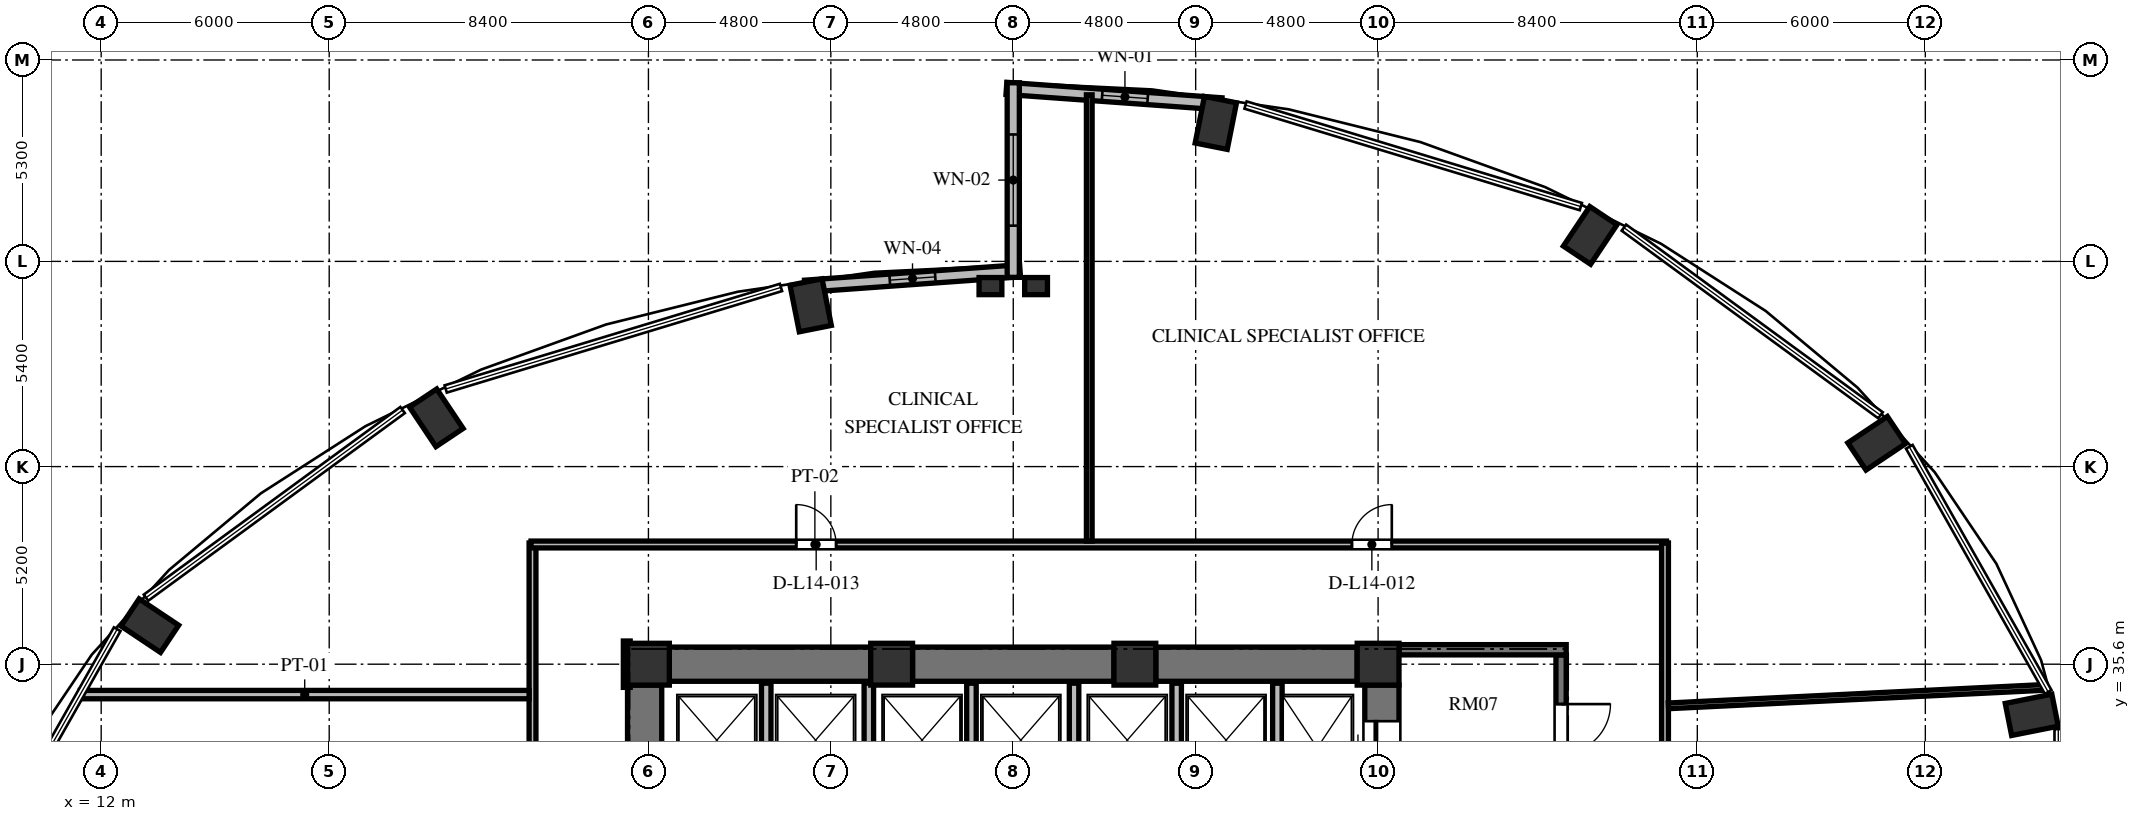
"""IFC4 building model, lengths in metres.
Left out: names, types, materials, properties, quantities, classifications, styles, units other than length and angle.
Written with IfcOpenShell. Run it as: python <this file> out.ifc"""

import sys

from ifc_helpers import new_model, si_unit, direction, frame, frame_2d, origin, origin_2d, place, context, subcontext, project, spatial, rectangle, extrude, element, fill, save


model = new_model("IFC4")
c1 = context("Model", 3, precision=1e-05, world=origin(), true_north=direction((0.0, 1.0)))
c2 = subcontext(c1, "Body", "Model", "MODEL_VIEW")
j1 = project(units=[si_unit("LENGTHUNIT", "METRE"), si_unit("PLANEANGLEUNIT", "RADIAN")], contexts=[c1])
p1 = place(None, origin())
s1 = spatial("IfcSite", under=j1, at=p1, CompositionType="ELEMENT")
p2 = place(p1, origin())
s2 = spatial("IfcBuilding", under=s1, at=p2, CompositionType="ELEMENT")
p3 = place(p2, frame((0.0, 0.0, 58.032)))
s3 = spatial("IfcBuildingStorey", under=s2, at=p3, CompositionType="ELEMENT", Elevation=58.032)
for number, where, z_axis, x_axis in (
    (1, (62.8, 34.268, 0.0), (0.0, 0.0, 1.0), (0.981, 0.195, 0.0)),
    (2, (58.72, 41.414, 0.0), (0.0, 0.0, 1.0), (0.831, 0.556, 0.0)),
    (3, (51.181, 46.884, 0.0), (0.0, 0.0, 1.0), (0.556, 0.831, 0.0)),
    (4, (41.331, 49.844, 0.0), (0.0, 0.0, 1.0), (0.195, 0.981, 0.0)),
    (5, (30.669, 45.044, 0.0), (0.0, 0.0, 1.0), (-0.195, 0.981, 0.0)),
    (6, (20.819, 42.084, 0.0), (0.0, 0.0, 1.0), (-0.556, 0.831, 0.0)),
    (7, (13.28, 36.614, 0.0), (0.0, 0.0, 1.0), (-0.831, 0.556, 0.0)),
):
    element("IfcColumn", number, at=place(p3, frame(where, z_axis=z_axis, x_axis=x_axis)), inside=s3, PredefinedType="COLUMN", context=c2, shape_type="SweptSolid", body=[
        extrude(rectangle(XDim=1.25, YDim=0.86, at=origin_2d()), origin(), (0.0, 0.0, 1.0), 3.648),
    ])
for number, where, z_axis, x_axis in (
    (8, (45.6, 35.6, 0.0), (0.0, 0.0, 1.0), (1.0, 0.0, 0.0)),
    (9, (39.2, 35.6, 0.0), (0.0, 0.0, 1.0), (1.0, 0.0, 0.0)),
    (10, (32.8, 35.6, 0.0), (0.0, 0.0, 1.0), (1.0, 0.0, 0.0)),
    (11, (26.4, 35.6, 0.0), (0.0, 0.0, 1.0), (1.0, 0.0, 0.0)),
):
    element("IfcColumn", number, at=place(p3, frame(where, z_axis=z_axis, x_axis=x_axis)), inside=s3, PredefinedType="COLUMN", context=c2, shape_type="SweptSolid", body=[
        extrude(rectangle(XDim=1.1, YDim=1.1, at=origin_2d()), origin(), (0.0, 0.0, 1.0), 3.648),
    ])
for number, where, z_axis, x_axis in (
    (12, (35.4, 45.55, 0.0), (0.0, 0.0, 1.0), (1.0, 0.0, 0.0)),
    (13, (36.6, 45.55, 0.0), (0.0, 0.0, 1.0), (1.0, 0.0, 0.0)),
):
    element("IfcColumn", number, at=place(p3, frame(where, z_axis=z_axis, x_axis=x_axis)), inside=s3, PredefinedType="PILASTER", context=c2, shape_type="SweptSolid", body=[
        extrude(rectangle(XDim=0.6, YDim=0.45, at=origin_2d()), origin(), (0.0, 0.0, 1.0), 3.648),
    ])
p4 = place(p3, frame((26.3, 20.95, 0.0), z_axis=(0.0, 0.0, 1.0), x_axis=(0.0, 1.0, 0.0)))
e14 = element("IfcWall", 14, at=p4, inside=s3, PredefinedType="SHEAR", context=c2, shape_type="SweptSolid", body=[
    extrude(rectangle(XDim=14.1, YDim=0.9, at=frame_2d((7.05, 0.0))), origin(), (0.0, 0.0, 1.0), 3.648),
])
p5 = place(p4, frame((6.5, 0.0, 0.0)))
e15 = element("IfcOpeningElement", 15, at=p5, cuts=e14, PredefinedType="OPENING", context=c2, shape_type="SweptSolid", body=[
    extrude(rectangle(XDim=1.2, YDim=2.15, at=frame_2d((0.6, 1.075))), frame((0.0, 0.46, 0.0), z_axis=(0.0, -1.0, 0.0), x_axis=(1.0, 0.0, 0.0)), (0.0, 0.0, 1.0), 0.92),
])
p6 = place(p4, frame((9.6, 0.0, 0.0)))
e16 = element("IfcOpeningElement", 16, at=p6, cuts=e14, PredefinedType="OPENING", context=c2, shape_type="SweptSolid", body=[
    extrude(rectangle(XDim=1.3, YDim=2.2, at=frame_2d((0.65, 1.1))), frame((0.0, 0.46, 0.0), z_axis=(0.0, -1.0, 0.0), x_axis=(1.0, 0.0, 0.0)), (0.0, 0.0, 1.0), 0.92),
])
p7 = place(p4, frame((3.26, 0.0, 0.0)))
e17 = element("IfcOpeningElement", 17, at=p7, cuts=e14, PredefinedType="OPENING", context=c2, shape_type="SweptSolid", body=[
    extrude(rectangle(XDim=1.3, YDim=2.2, at=frame_2d((0.65, 1.1))), frame((0.0, 0.46, 0.0), z_axis=(0.0, -1.0, 0.0), x_axis=(1.0, 0.0, 0.0)), (0.0, 0.0, 1.0), 0.92),
])
p8 = place(p3, frame((45.7, 20.95, 0.0), z_axis=(0.0, 0.0, 1.0), x_axis=(0.0, 1.0, 0.0)))
e18 = element("IfcWall", 18, at=p8, inside=s3, PredefinedType="SHEAR", context=c2, shape_type="SweptSolid", body=[
    extrude(rectangle(XDim=14.1, YDim=0.9, at=frame_2d((7.05, 0.0))), origin(), (0.0, 0.0, 1.0), 3.648),
])
p9 = place(p8, frame((11.75, 0.0, 0.0)))
e19 = element("IfcOpeningElement", 19, at=p9, cuts=e18, PredefinedType="OPENING", context=c2, shape_type="SweptSolid", body=[
    extrude(rectangle(XDim=1.4, YDim=2.3, at=frame_2d((0.7, 1.15))), frame((0.0, 0.46, 0.0), z_axis=(0.0, -1.0, 0.0), x_axis=(1.0, 0.0, 0.0)), (0.0, 0.0, 1.0), 0.92),
])
p10 = place(p8, frame((0.95, 0.0, 0.0)))
e20 = element("IfcOpeningElement", 20, at=p10, cuts=e18, PredefinedType="OPENING", context=c2, shape_type="SweptSolid", body=[
    extrude(rectangle(XDim=1.4, YDim=2.3, at=frame_2d((0.7, 1.15))), frame((0.0, 0.46, 0.0), z_axis=(0.0, -1.0, 0.0), x_axis=(1.0, 0.0, 0.0)), (0.0, 0.0, 1.0), 0.92),
])
p11 = place(p3, frame((26.95, 35.6, 0.0), z_axis=(0.0, 0.0, 1.0), x_axis=(1.0, 0.0, 0.0)))
e21 = element("IfcWall", 21, at=p11, inside=s3, PredefinedType="SHEAR", context=c2, shape_type="SweptSolid", body=[
    extrude(rectangle(XDim=5.3, YDim=0.9, at=frame_2d((2.65, 0.0))), origin(), (0.0, 0.0, 1.0), 3.648),
])
p12 = place(p3, frame((33.35, 35.6, 0.0), z_axis=(0.0, 0.0, 1.0), x_axis=(1.0, 0.0, 0.0)))
e22 = element("IfcWall", 22, at=p12, inside=s3, PredefinedType="SHEAR", context=c2, shape_type="SweptSolid", body=[
    extrude(rectangle(XDim=5.3, YDim=0.9, at=frame_2d((2.65, 0.0))), origin(), (0.0, 0.0, 1.0), 3.648),
])
p13 = place(p3, frame((39.75, 35.6, 0.0), z_axis=(0.0, 0.0, 1.0), x_axis=(1.0, 0.0, 0.0)))
e23 = element("IfcWall", 23, at=p13, inside=s3, PredefinedType="SHEAR", context=c2, shape_type="SweptSolid", body=[
    extrude(rectangle(XDim=5.3, YDim=0.9, at=frame_2d((2.65, 0.0))), origin(), (0.0, 0.0, 1.0), 3.648),
])
p14 = place(p3, frame((41.481, 50.346, 0.0), z_axis=(0.0, 0.0, 1.0), x_axis=(-0.997422321809, 0.071754525696, 0.0)))
e24 = element("IfcWall", 24, at=p14, inside=s3, PredefinedType="SOLIDWALL", context=c2, shape_type="SweptSolid", body=[
    extrude(rectangle(XDim=5.675, YDim=0.32, at=frame_2d((2.838, 0.0))), origin(), (0.0, 0.0, 1.0), 3.428),
])
p15 = place(p14, frame((1.949, 0.0, 0.85)))
e25 = element("IfcOpeningElement", 25, at=p15, cuts=e24, PredefinedType="OPENING", context=c2, shape_type="SweptSolid", body=[
    extrude(rectangle(XDim=1.2, YDim=2.2, at=frame_2d((0.6, 1.1))), frame((0.0, 0.17, 0.0), z_axis=(0.0, -1.0, 0.0), x_axis=(1.0, 0.0, 0.0)), (0.0, 0.0, 1.0), 0.34),
])
p16 = place(p3, frame((36.179, 45.953, 0.0), z_axis=(0.0, 0.0, 1.0), x_axis=(-0.997421878774, -0.071760683825, 0.0)))
e26 = element("IfcWall", 26, at=p16, inside=s3, PredefinedType="SOLIDWALL", context=c2, shape_type="SweptSolid", body=[
    extrude(rectangle(XDim=5.675, YDim=0.32, at=frame_2d((2.837, 0.0))), origin(), (0.0, 0.0, 1.0), 3.428),
])
p17 = place(p16, frame((2.237, 0.0, 0.85)))
e27 = element("IfcOpeningElement", 27, at=p17, cuts=e26, PredefinedType="OPENING", context=c2, shape_type="SweptSolid", body=[
    extrude(rectangle(XDim=1.2, YDim=1.8, at=frame_2d((0.6, 0.9))), frame((0.0, 0.17, 0.0), z_axis=(0.0, -1.0, 0.0), x_axis=(1.0, 0.0, 0.0)), (0.0, 0.0, 1.0), 0.34),
])
p18 = place(p3, frame((36.0, 50.9, 0.0), z_axis=(0.0, 0.0, 1.0), x_axis=(0.0, -1.0, 0.0)))
e28 = element("IfcWall", 28, at=p18, inside=s3, PredefinedType="SOLIDWALL", context=c2, shape_type="SweptSolid", body=[
    extrude(rectangle(XDim=5.12, YDim=0.32, at=frame_2d((2.56, 0.0))), origin(), (0.0, 0.0, 1.0), 3.428),
])
p19 = place(p18, frame((1.36, 0.0, 0.84)))
e29 = element("IfcOpeningElement", 29, at=p19, cuts=e28, PredefinedType="OPENING", context=c2, shape_type="SweptSolid", body=[
    extrude(rectangle(XDim=2.4, YDim=2.04, at=frame_2d((1.2, 1.02))), frame((0.0, 0.17, 0.0), z_axis=(0.0, -1.0, 0.0), x_axis=(1.0, 0.0, 0.0)), (0.0, 0.0, 1.0), 0.34),
])
p20 = place(p3, frame((42.95, 31.92, 0.0), z_axis=(0.0, 0.0, 1.0), x_axis=(0.0, 1.0, 0.0)))
e30 = element("IfcWall", 30, at=p20, inside=s3, PredefinedType="SOLIDWALL", context=c2, shape_type="SweptSolid", body=[
    extrude(rectangle(XDim=3.18, YDim=0.25, at=frame_2d((1.59, 0.0))), origin(), (0.0, 0.0, 1.0), 3.428),
])
for number, where, z_axis, x_axis in (
    (31, (29.5, 32.42, 0.0), (0.0, 0.0, 1.0), (0.0, 1.0, 0.0)),
    (32, (32.2, 32.42, 0.0), (0.0, 0.0, 1.0), (0.0, 1.0, 0.0)),
    (33, (34.9, 32.42, 0.0), (0.0, 0.0, 1.0), (0.0, 1.0, 0.0)),
    (34, (37.6, 32.42, 0.0), (0.0, 0.0, 1.0), (0.0, 1.0, 0.0)),
    (35, (40.3, 32.42, 0.0), (0.0, 0.0, 1.0), (0.0, 1.0, 0.0)),
):
    element("IfcWall", number, at=place(p3, frame(where, z_axis=z_axis, x_axis=x_axis)), inside=s3, PredefinedType="SOLIDWALL", context=c2, shape_type="SweptSolid", body=[
        extrude(rectangle(XDim=2.68, YDim=0.25, at=frame_2d((1.34, 0.0))), origin(), (0.0, 0.0, 1.0), 3.428),
    ])
p21 = place(p3, frame((50.415, 35.845, 0.0), z_axis=(0.0, 0.0, 1.0), x_axis=(0.0, -1.0, 0.0)))
e36 = element("IfcWall", 36, at=p21, inside=s3, PredefinedType="SHEAR", context=c2, shape_type="SweptSolid", body=[
    extrude(rectangle(XDim=15.825, YDim=0.27, at=frame_2d((7.913, 0.0))), origin(), (0.0, 0.0, 1.0), 3.648),
])
p22 = place(p21, frame((4.445, 0.0, 0.0)))
e37 = element("IfcOpeningElement", 37, at=p22, cuts=e36, PredefinedType="OPENING", context=c2, shape_type="SweptSolid", body=[
    extrude(rectangle(XDim=1.2, YDim=2.15, at=frame_2d((0.6, 1.075))), frame((0.0, 0.145, 0.0), z_axis=(0.0, -1.0, 0.0), x_axis=(1.0, 0.0, 0.0)), (0.0, 0.0, 1.0), 0.29),
])
p23 = place(p21, frame((1.295, 0.0, 0.0)))
e38 = element("IfcOpeningElement", 38, at=p23, cuts=e36, PredefinedType="OPENING", context=c2, shape_type="SweptSolid", body=[
    extrude(rectangle(XDim=1.3, YDim=2.2, at=frame_2d((0.65, 1.1))), frame((0.0, 0.145, 0.0), z_axis=(0.0, -1.0, 0.0), x_axis=(1.0, 0.0, 0.0)), (0.0, 0.0, 1.0), 0.29),
])
p24 = place(p21, frame((13.095, 0.0, 0.0)))
e39 = element("IfcOpeningElement", 39, at=p24, cuts=e36, PredefinedType="OPENING", context=c2, shape_type="SweptSolid", body=[
    extrude(rectangle(XDim=1.3, YDim=2.2, at=frame_2d((0.65, 1.1))), frame((0.0, 0.145, 0.0), z_axis=(0.0, -1.0, 0.0), x_axis=(1.0, 0.0, 0.0)), (0.0, 0.0, 1.0), 0.29),
])
p25 = place(p3, frame((46.15, 35.98, 0.0), z_axis=(0.0, 0.0, 1.0), x_axis=(1.0, 0.0, 0.0)))
e40 = element("IfcWall", 40, at=p25, inside=s3, PredefinedType="SHEAR", context=c2, shape_type="SweptSolid", body=[
    extrude(rectangle(XDim=4.4, YDim=0.27, at=frame_2d((2.2, 0.0))), origin(), (0.0, 0.0, 1.0), 3.648),
])
p26 = place(p3, frame((23.35, 29.36, 0.0), z_axis=(0.0, 0.0, 1.0), x_axis=(0.0, 1.0, 0.0)))
e41 = element("IfcWall", 41, at=p26, inside=s3, PredefinedType="PARTITIONING", context=c2, shape_type="SweptSolid", body=[
    extrude(rectangle(XDim=9.43, YDim=0.18, at=frame_2d((4.715, 0.0))), origin(), (0.0, 0.0, 1.0), 3.428),
])
p27 = place(p3, frame((23.31, 38.75, 0.0), z_axis=(0.0, 0.0, 1.0), x_axis=(1.0, 0.0, 0.0)))
e42 = element("IfcWall", 42, at=p27, inside=s3, PredefinedType="PARTITIONING", context=c2, shape_type="SweptSolid", body=[
    extrude(rectangle(XDim=29.88, YDim=0.18, at=frame_2d((14.94, 0.0))), origin(), (0.0, 0.0, 1.0), 3.053),
])
p28 = place(p27, frame((21.601, 0.0, 0.0)))
e43 = element("IfcOpeningElement", 43, at=p28, cuts=e42, PredefinedType="OPENING", context=c2, shape_type="SweptSolid", body=[
    extrude(rectangle(XDim=1.05, YDim=2.15, at=frame_2d((0.525, 1.075))), frame((0.0, 0.1, 0.0), z_axis=(0.0, -1.0, 0.0), x_axis=(1.0, 0.0, 0.0)), (0.0, 0.0, 1.0), 0.2),
])
p29 = place(p27, frame((6.979, 0.0, 0.0)))
e44 = element("IfcOpeningElement", 44, at=p29, cuts=e42, PredefinedType="OPENING", context=c2, shape_type="SweptSolid", body=[
    extrude(rectangle(XDim=1.05, YDim=2.15, at=frame_2d((0.525, 1.075))), frame((0.0, 0.1, 0.0), z_axis=(0.0, -1.0, 0.0), x_axis=(1.0, 0.0, 0.0)), (0.0, 0.0, 1.0), 0.2),
])
p30 = place(p3, frame((53.15, 38.79, 0.0), z_axis=(0.0, 0.0, 1.0), x_axis=(0.0, -1.0, 0.0)))
e45 = element("IfcWall", 45, at=p30, inside=s3, PredefinedType="PARTITIONING", context=c2, shape_type="SweptSolid", body=[
    extrude(rectangle(XDim=9.43, YDim=0.18, at=frame_2d((4.715, 0.0))), origin(), (0.0, 0.0, 1.0), 3.428),
])
p31 = place(p3, frame((25.83, 36.21, 0.0), z_axis=(0.0, 0.0, 1.0), x_axis=(0.0, -1.0, 0.0)))
e46 = element("IfcWall", 46, at=p31, inside=s3, PredefinedType="PARTITIONING", context=c2, shape_type="SweptSolid", body=[
    extrude(rectangle(XDim=1.22, YDim=0.18, at=frame_2d((0.61, 0.0))), origin(), (0.0, 0.0, 1.0), 3.428),
])
p32 = place(p3, frame((11.451, 34.8, 0.0), z_axis=(0.0, 0.0, 1.0), x_axis=(1.0, 0.0, 0.0)))
e47 = element("IfcWall", 47, at=p32, inside=s3, PredefinedType="PARTITIONING", context=c2, shape_type="SweptSolid", body=[
    extrude(rectangle(XDim=11.809, YDim=0.22, at=frame_2d((5.905, 0.0))), origin(), (0.0, 0.0, 1.0), 3.428),
])
p33 = place(p3, frame((53.24, 34.504, 0.0), z_axis=(0.0, 0.0, 1.0), x_axis=(0.998798003682, 0.049015791742, 0.0)))
e48 = element("IfcWall", 48, at=p33, inside=s3, PredefinedType="PARTITIONING", context=c2, shape_type="SweptSolid", body=[
    extrude(rectangle(XDim=9.947, YDim=0.15, at=frame_2d((4.973, 0.0))), origin(), (0.0, 0.0, 1.0), 2.813),
])
p34 = place(p3, frame((38.0, 38.84, 0.0), z_axis=(0.0, 0.0, 1.0), x_axis=(0.0, 1.0, 0.0)))
e49 = element("IfcWall", 49, at=p34, inside=s3, PredefinedType="PARTITIONING", context=c2, shape_type="SweptSolid", body=[
    extrude(rectangle(XDim=11.743, YDim=0.15, at=frame_2d((5.872, 0.0))), origin(), (0.0, 0.0, 1.0), 3.428),
])
p35 = place(p15, origin())
e50 = element("IfcWindow", 50, at=p35, inside=s3, PartitioningType="SINGLE_PANEL", PredefinedType="WINDOW", context=c2, shape_type="SweptSolid", body=[
    extrude(rectangle(XDim=1.2, YDim=2.2, at=frame_2d((0.6, 1.1))), frame((0.0, 0.03, 0.0), z_axis=(0.0, -1.0, 0.0), x_axis=(1.0, 0.0, 0.0)), (0.0, 0.0, 1.0), 0.06),
])
fill(e25, e50)
p36 = place(p17, origin())
e51 = element("IfcWindow", 51, at=p36, inside=s3, PartitioningType="SINGLE_PANEL", PredefinedType="WINDOW", context=c2, shape_type="SweptSolid", body=[
    extrude(rectangle(XDim=1.2, YDim=1.8, at=frame_2d((0.6, 0.9))), frame((0.0, 0.03, 0.0), z_axis=(0.0, -1.0, 0.0), x_axis=(1.0, 0.0, 0.0)), (0.0, 0.0, 1.0), 0.06),
])
fill(e27, e51)
p37 = place(p19, origin())
e52 = element("IfcWindow", 52, at=p37, inside=s3, PartitioningType="SINGLE_PANEL", PredefinedType="WINDOW", context=c2, shape_type="SweptSolid", body=[
    extrude(rectangle(XDim=2.4, YDim=2.04, at=frame_2d((1.2, 1.02))), frame((0.0, 0.03, 0.0), z_axis=(0.0, -1.0, 0.0), x_axis=(1.0, 0.0, 0.0)), (0.0, 0.0, 1.0), 0.06),
])
fill(e29, e52)
p38 = place(p9, origin())
e53 = element("IfcDoor", 53, at=p38, inside=s3, OperationType="SLIDING_TO_LEFT", PredefinedType="DOOR", context=c2, shape_type="SweptSolid", body=[
    extrude(rectangle(XDim=1.4, YDim=2.3, at=frame_2d((0.7, 1.15))), frame((0.0, 0.025, 0.0), z_axis=(0.0, -1.0, 0.0), x_axis=(1.0, 0.0, 0.0)), (0.0, 0.0, 1.0), 0.05),
])
fill(e19, e53)
p39 = place(p23, origin())
e54 = element("IfcDoor", 54, at=p39, inside=s3, OperationType="SINGLE_SWING_LEFT", PredefinedType="DOOR", context=c2, shape_type="SweptSolid", body=[
    extrude(rectangle(XDim=1.3, YDim=2.2, at=frame_2d((0.65, 1.1))), frame((0.0, 0.025, 0.0), z_axis=(0.0, -1.0, 0.0), x_axis=(1.0, 0.0, 0.0)), (0.0, 0.0, 1.0), 0.05),
])
fill(e38, e54)
p40 = place(p28, origin())
e55 = element("IfcDoor", 55, at=p40, inside=s3, OperationType="SINGLE_SWING_RIGHT", PredefinedType="DOOR", context=c2, shape_type="SweptSolid", body=[
    extrude(rectangle(XDim=1.05, YDim=2.15, at=frame_2d((0.525, 1.075))), frame((0.0, 0.025, 0.0), z_axis=(0.0, -1.0, 0.0), x_axis=(1.0, 0.0, 0.0)), (0.0, 0.0, 1.0), 0.05),
])
fill(e43, e55)
p41 = place(p29, origin())
e56 = element("IfcDoor", 56, at=p41, inside=s3, OperationType="SINGLE_SWING_LEFT", PredefinedType="DOOR", context=c2, shape_type="SweptSolid", body=[
    extrude(rectangle(XDim=1.05, YDim=2.15, at=frame_2d((0.525, 1.075))), frame((0.0, 0.025, 0.0), z_axis=(0.0, -1.0, 0.0), x_axis=(1.0, 0.0, 0.0)), (0.0, 0.0, 1.0), 0.05),
])
fill(e44, e56)
save(model, sys.argv[1])
